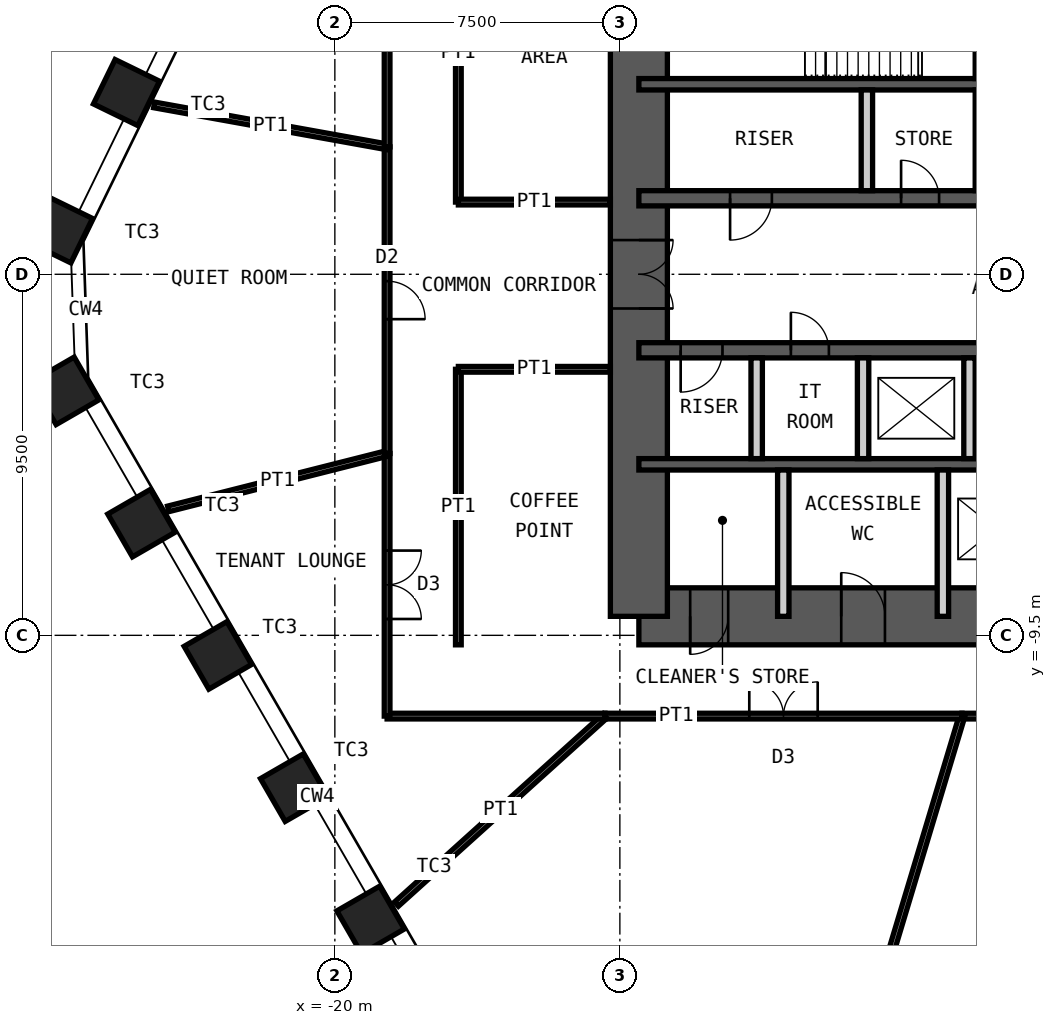
"""IFC4 building model, lengths in metres.
Left out: names, types, materials, properties, quantities, classifications, styles, units other than length and angle.
Written with IfcOpenShell. Run it as: python <this file> out.ifc"""

import sys

from ifc_helpers import new_model, si_unit, direction, frame, frame_2d, origin, origin_2d, place, context, subcontext, project, spatial, rectangle, hollow_rectangle, extrude, element, fill, save


model = new_model("IFC4")
c1 = context("Model", 3, precision=1e-05, world=origin(), true_north=direction((0.0, 1.0)))
c2 = subcontext(c1, "Body", "Model", "MODEL_VIEW")
j1 = project(units=[si_unit("LENGTHUNIT", "METRE"), si_unit("PLANEANGLEUNIT", "RADIAN")], contexts=[c1])
p1 = place(None, origin())
s1 = spatial("IfcSite", under=j1, at=p1, CompositionType="ELEMENT")
p2 = place(p1, origin())
s2 = spatial("IfcBuilding", under=s1, at=p2, CompositionType="ELEMENT")
p3 = place(p2, frame((0.0, 0.0, 132.4)))
s3 = spatial("IfcBuildingStorey", under=s2, at=p3, CompositionType="ELEMENT", Elevation=132.4)
for number, where, z_axis, x_axis in (
    (1, (-19.059, -16.989, 0.0), (0.0, 0.0, 1.0), (0.5, -0.866, 0.0)),
    (2, (-21.068, -13.509, 0.0), (0.0, 0.0, 1.0), (0.5, -0.866, 0.0)),
    (3, (-23.078, -10.028, 0.0), (0.0, 0.0, 1.0), (0.5, -0.866, 0.0)),
    (4, (-25.087, -6.547, 0.0), (0.0, 0.0, 1.0), (0.5, -0.866, 0.0)),
    (5, (-27.097, -3.067, 0.0), (0.0, 0.0, 1.0), (0.5, -0.866, 0.0)),
    (6, (-27.245, 1.169, 0.0), (0.0, 0.0, 1.0), (-0.438, -0.899, 0.0)),
    (7, (-25.483, 4.781, 0.0), (0.0, 0.0, 1.0), (-0.438, -0.899, 0.0)),
):
    element("IfcColumn", number, at=place(p3, frame(where, z_axis=z_axis, x_axis=x_axis)), inside=s3, PredefinedType="COLUMN", context=c2, shape_type="SweptSolid", body=[
        extrude(hollow_rectangle(XDim=1.3, YDim=1.3, WallThickness=0.1, at=origin_2d()), origin(), (0.0, 0.0, 1.0), 4.2),
    ])
p4 = place(p3, frame((-12.0, -9.0, 0.0), z_axis=(0.0, 0.0, 1.0), x_axis=(1.0, 0.0, 0.0)))
e8 = element("IfcWall", 8, at=p4, inside=s3, PredefinedType="SHEAR", context=c2, shape_type="SweptSolid", body=[
    extrude(rectangle(XDim=24.0, YDim=1.5, at=frame_2d((12.0, 0.0))), origin(), (0.0, 0.0, 1.0), 4.2),
])
p5 = place(p4, frame((1.35, 0.0, 0.0)))
e9 = element("IfcOpeningElement", 9, at=p5, cuts=e8, PredefinedType="OPENING", context=c2, shape_type="SweptSolid", body=[
    extrude(rectangle(XDim=1.0, YDim=2.1, at=frame_2d((0.5, 1.05))), frame((0.0, 0.76, 0.0), z_axis=(0.0, -1.0, 0.0), x_axis=(1.0, 0.0, 0.0)), (0.0, 0.0, 1.0), 1.52),
])
p6 = place(p4, frame((5.325, 0.0, 0.0)))
e10 = element("IfcOpeningElement", 10, at=p6, cuts=e8, PredefinedType="OPENING", context=c2, shape_type="SweptSolid", body=[
    extrude(rectangle(XDim=1.15, YDim=2.1, at=frame_2d((0.575, 1.05))), frame((0.0, 0.76, 0.0), z_axis=(0.0, -1.0, 0.0), x_axis=(1.0, 0.0, 0.0)), (0.0, 0.0, 1.0), 1.52),
])
p7 = place(p4, frame((12.6, 0.0, 0.0)))
e11 = element("IfcOpeningElement", 11, at=p7, cuts=e8, PredefinedType="OPENING", context=c2, shape_type="SweptSolid", body=[
    extrude(rectangle(XDim=1.0, YDim=2.1, at=frame_2d((0.5, 1.05))), frame((0.0, 0.76, 0.0), z_axis=(0.0, -1.0, 0.0), x_axis=(1.0, 0.0, 0.0)), (0.0, 0.0, 1.0), 1.52),
])
p8 = place(p3, frame((-12.0, -9.0, 0.0), z_axis=(0.0, 0.0, 1.0), x_axis=(0.0, 1.0, 0.0)))
e12 = element("IfcWall", 12, at=p8, inside=s3, PredefinedType="SHEAR", context=c2, shape_type="SweptSolid", body=[
    extrude(rectangle(XDim=18.0, YDim=1.5, at=frame_2d((9.0, 0.0))), origin(), (0.0, 0.0, 1.0), 4.2),
])
p9 = place(p8, frame((8.1, 0.0, 0.0)))
e13 = element("IfcOpeningElement", 13, at=p9, cuts=e12, PredefinedType="OPENING", context=c2, shape_type="SweptSolid", body=[
    extrude(rectangle(XDim=1.8, YDim=2.1, at=frame_2d((0.9, 1.05))), frame((0.0, 0.76, 0.0), z_axis=(0.0, -1.0, 0.0), x_axis=(1.0, 0.0, 0.0)), (0.0, 0.0, 1.0), 1.52),
])
p10 = place(p3, frame((-12.0, 5.0, 0.0), z_axis=(0.0, 0.0, 1.0), x_axis=(1.0, 0.0, 0.0)))
e14 = element("IfcWall", 14, at=p10, inside=s3, PredefinedType="SHEAR", context=c2, shape_type="SweptSolid", body=[
    extrude(rectangle(XDim=24.0, YDim=0.3, at=frame_2d((12.0, 0.0))), origin(), (0.0, 0.0, 1.0), 4.2),
])
p11 = place(p3, frame((-12.0, 2.0, 0.0), z_axis=(0.0, 0.0, 1.0), x_axis=(1.0, 0.0, 0.0)))
e15 = element("IfcWall", 15, at=p11, inside=s3, PredefinedType="SHEAR", context=c2, shape_type="SweptSolid", body=[
    extrude(rectangle(XDim=24.0, YDim=0.4, at=frame_2d((12.0, 0.0))), origin(), (0.0, 0.0, 1.0), 4.2),
])
p12 = place(p11, frame((2.4, 0.0, 0.0)))
e16 = element("IfcOpeningElement", 16, at=p12, cuts=e15, PredefinedType="OPENING", context=c2, shape_type="SweptSolid", body=[
    extrude(rectangle(XDim=1.1, YDim=2.1, at=frame_2d((0.55, 1.05))), frame((0.0, 0.21, 0.0), z_axis=(0.0, -1.0, 0.0), x_axis=(1.0, 0.0, 0.0)), (0.0, 0.0, 1.0), 0.42),
])
p13 = place(p11, frame((22.0, 0.0, 0.0)))
e17 = element("IfcOpeningElement", 17, at=p13, cuts=e15, PredefinedType="OPENING", context=c2, shape_type="SweptSolid", body=[
    extrude(rectangle(XDim=1.1, YDim=2.1, at=frame_2d((0.55, 1.05))), frame((0.0, 0.21, 0.0), z_axis=(0.0, -1.0, 0.0), x_axis=(1.0, 0.0, 0.0)), (0.0, 0.0, 1.0), 0.42),
])
p14 = place(p11, frame((10.15, 0.0, 0.0)))
e18 = element("IfcOpeningElement", 18, at=p14, cuts=e15, PredefinedType="OPENING", context=c2, shape_type="SweptSolid", body=[
    extrude(rectangle(XDim=1.0, YDim=2.1, at=frame_2d((0.5, 1.05))), frame((0.0, 0.21, 0.0), z_axis=(0.0, -1.0, 0.0), x_axis=(1.0, 0.0, 0.0)), (0.0, 0.0, 1.0), 0.42),
])
p15 = place(p11, frame((6.9, 0.0, 0.0)))
e19 = element("IfcOpeningElement", 19, at=p15, cuts=e15, PredefinedType="OPENING", context=c2, shape_type="SweptSolid", body=[
    extrude(rectangle(XDim=1.0, YDim=2.1, at=frame_2d((0.5, 1.05))), frame((0.0, 0.21, 0.0), z_axis=(0.0, -1.0, 0.0), x_axis=(1.0, 0.0, 0.0)), (0.0, 0.0, 1.0), 0.42),
])
p16 = place(p11, frame((13.35, 0.0, 0.0)))
e20 = element("IfcOpeningElement", 20, at=p16, cuts=e15, PredefinedType="OPENING", context=c2, shape_type="SweptSolid", body=[
    extrude(rectangle(XDim=1.1, YDim=2.4, at=frame_2d((0.55, 1.2))), frame((0.0, 0.21, 0.0), z_axis=(0.0, -1.0, 0.0), x_axis=(1.0, 0.0, 0.0)), (0.0, 0.0, 1.0), 0.42),
])
p17 = place(p11, frame((16.15, 0.0, 0.0)))
e21 = element("IfcOpeningElement", 21, at=p17, cuts=e15, PredefinedType="OPENING", context=c2, shape_type="SweptSolid", body=[
    extrude(rectangle(XDim=1.1, YDim=2.4, at=frame_2d((0.55, 1.2))), frame((0.0, 0.21, 0.0), z_axis=(0.0, -1.0, 0.0), x_axis=(1.0, 0.0, 0.0)), (0.0, 0.0, 1.0), 0.42),
])
p18 = place(p11, frame((18.95, 0.0, 0.0)))
e22 = element("IfcOpeningElement", 22, at=p18, cuts=e15, PredefinedType="OPENING", context=c2, shape_type="SweptSolid", body=[
    extrude(rectangle(XDim=1.1, YDim=2.4, at=frame_2d((0.55, 1.2))), frame((0.0, 0.21, 0.0), z_axis=(0.0, -1.0, 0.0), x_axis=(1.0, 0.0, 0.0)), (0.0, 0.0, 1.0), 0.42),
])
p19 = place(p3, frame((-12.0, -2.0, 0.0), z_axis=(0.0, 0.0, 1.0), x_axis=(1.0, 0.0, 0.0)))
e23 = element("IfcWall", 23, at=p19, inside=s3, PredefinedType="SHEAR", context=c2, shape_type="SweptSolid", body=[
    extrude(rectangle(XDim=24.0, YDim=0.4, at=frame_2d((12.0, 0.0))), origin(), (0.0, 0.0, 1.0), 4.2),
])
p20 = place(p19, frame((1.1, 0.0, 0.0)))
e24 = element("IfcOpeningElement", 24, at=p20, cuts=e23, PredefinedType="OPENING", context=c2, shape_type="SweptSolid", body=[
    extrude(rectangle(XDim=1.1, YDim=2.1, at=frame_2d((0.55, 1.05))), frame((0.0, 0.21, 0.0), z_axis=(0.0, -1.0, 0.0), x_axis=(1.0, 0.0, 0.0)), (0.0, 0.0, 1.0), 0.42),
])
p21 = place(p19, frame((13.55, 0.0, 0.0)))
e25 = element("IfcOpeningElement", 25, at=p21, cuts=e23, PredefinedType="OPENING", context=c2, shape_type="SweptSolid", body=[
    extrude(rectangle(XDim=1.1, YDim=2.1, at=frame_2d((0.55, 1.05))), frame((0.0, 0.21, 0.0), z_axis=(0.0, -1.0, 0.0), x_axis=(1.0, 0.0, 0.0)), (0.0, 0.0, 1.0), 0.42),
])
p22 = place(p19, frame((20.7, 0.0, 0.0)))
e26 = element("IfcOpeningElement", 26, at=p22, cuts=e23, PredefinedType="OPENING", context=c2, shape_type="SweptSolid", body=[
    extrude(rectangle(XDim=1.1, YDim=2.1, at=frame_2d((0.55, 1.05))), frame((0.0, 0.21, 0.0), z_axis=(0.0, -1.0, 0.0), x_axis=(1.0, 0.0, 0.0)), (0.0, 0.0, 1.0), 0.42),
])
p23 = place(p19, frame((4.0, 0.0, 0.0)))
e27 = element("IfcOpeningElement", 27, at=p23, cuts=e23, PredefinedType="OPENING", context=c2, shape_type="SweptSolid", body=[
    extrude(rectangle(XDim=1.0, YDim=2.1, at=frame_2d((0.5, 1.05))), frame((0.0, 0.21, 0.0), z_axis=(0.0, -1.0, 0.0), x_axis=(1.0, 0.0, 0.0)), (0.0, 0.0, 1.0), 0.42),
])
p24 = place(p3, frame((-12.0, -5.0, 0.0), z_axis=(0.0, 0.0, 1.0), x_axis=(1.0, 0.0, 0.0)))
e28 = element("IfcWall", 28, at=p24, inside=s3, PredefinedType="SHEAR", context=c2, shape_type="SweptSolid", body=[
    extrude(rectangle(XDim=24.0, YDim=0.3, at=frame_2d((12.0, 0.0))), origin(), (0.0, 0.0, 1.0), 4.2),
])
p25 = place(p3, frame((-3.0, 5.15, 0.0), z_axis=(0.0, 0.0, 1.0), x_axis=(0.0, 1.0, 0.0)))
e29 = element("IfcWall", 29, at=p25, inside=s3, PredefinedType="PARTITIONING", context=c2, shape_type="SweptSolid", body=[
    extrude(rectangle(XDim=3.85, YDim=0.3, at=frame_2d((1.925, 0.0))), origin(), (0.0, 0.0, 1.0), 3.98),
])
p26 = place(p25, frame((1.425, 0.0, 0.0)))
e30 = element("IfcOpeningElement", 30, at=p26, cuts=e29, PredefinedType="OPENING", context=c2, shape_type="SweptSolid", body=[
    extrude(rectangle(XDim=1.0, YDim=2.1, at=frame_2d((0.5, 1.05))), frame((0.0, 0.16, 0.0), z_axis=(0.0, -1.0, 0.0), x_axis=(1.0, 0.0, 0.0)), (0.0, 0.0, 1.0), 0.32),
])
for number, where, z_axis, x_axis in (
    (31, (-6.0, 2.2, 0.0), (0.0, 0.0, 1.0), (0.0, 1.0, 0.0)),
    (32, (-3.0, 2.2, 0.0), (0.0, 0.0, 1.0), (0.0, 1.0, 0.0)),
    (33, (-8.9, -4.85, 0.0), (0.0, 0.0, 1.0), (0.0, 1.0, 0.0)),
    (34, (-6.1, -4.85, 0.0), (0.0, 0.0, 1.0), (0.0, 1.0, 0.0)),
    (35, (-3.3, -4.85, 0.0), (0.0, 0.0, 1.0), (0.0, 1.0, 0.0)),
):
    element("IfcWall", number, at=place(p3, frame(where, z_axis=z_axis, x_axis=x_axis)), inside=s3, PredefinedType="PARTITIONING", context=c2, shape_type="SweptSolid", body=[
        extrude(rectangle(XDim=2.65, YDim=0.3, at=frame_2d((1.325, 0.0))), origin(), (0.0, 0.0, 1.0), 3.98),
    ])
for number, where, z_axis, x_axis in (
    (36, (-8.2, -9.0, 0.0), (0.0, 0.0, 1.0), (0.0, 1.0, 0.0)),
    (37, (-4.0, -9.0, 0.0), (0.0, 0.0, 1.0), (0.0, 1.0, 0.0)),
):
    element("IfcWall", number, at=place(p3, frame(where, z_axis=z_axis, x_axis=x_axis)), inside=s3, PredefinedType="PARTITIONING", context=c2, shape_type="SweptSolid", body=[
        extrude(rectangle(XDim=3.85, YDim=0.3, at=frame_2d((1.925, 0.0))), origin(), (0.0, 0.0, 1.0), 3.98),
    ])
p27 = place(p3, frame((2.197, -11.625, 0.0), z_axis=(0.0, 0.0, 1.0), x_axis=(-1.0, 0.0, 0.0)))
e38 = element("IfcWall", 38, at=p27, inside=s3, PredefinedType="PARTITIONING", context=c2, shape_type="SweptSolid", body=[
    extrude(rectangle(XDim=5.694, YDim=0.15, at=frame_2d((2.847, 0.0))), origin(), (0.0, 0.0, 1.0), 4.03),
])
p28 = place(p27, frame((1.947, 0.0, 0.0)))
e39 = element("IfcOpeningElement", 39, at=p28, cuts=e38, PredefinedType="OPENING", context=c2, shape_type="SweptSolid", body=[
    extrude(rectangle(XDim=1.8, YDim=2.4, at=frame_2d((0.9, 1.2))), frame((0.0, 0.085, 0.0), z_axis=(0.0, -1.0, 0.0), x_axis=(1.0, 0.0, 0.0)), (0.0, 0.0, 1.0), 0.17),
])
p29 = place(p3, frame((-7.456, -24.787, 0.0), z_axis=(0.0, 0.0, 1.0), x_axis=(0.288055049501, 0.957613851433, 0.0)))
e40 = element("IfcWall", 40, at=p29, inside=s3, PredefinedType="PARTITIONING", context=c2, shape_type="SweptSolid", body=[
    extrude(rectangle(XDim=13.745, YDim=0.15, at=frame_2d((6.872, 0.0))), origin(), (0.0, 0.0, 1.0), 3.28),
])
p30 = place(p3, frame((-3.497, -11.625, 0.0), z_axis=(0.0, 0.0, 1.0), x_axis=(-1.0, 0.0, 0.0)))
e41 = element("IfcWall", 41, at=p30, inside=s3, PredefinedType="PARTITIONING", context=c2, shape_type="SweptSolid", body=[
    extrude(rectangle(XDim=9.395, YDim=0.15, at=frame_2d((4.698, 0.0))), origin(), (0.0, 0.0, 1.0), 4.03),
])
p31 = place(p30, frame((3.798, 0.0, 0.0)))
e42 = element("IfcOpeningElement", 42, at=p31, cuts=e41, PredefinedType="OPENING", context=c2, shape_type="SweptSolid", body=[
    extrude(rectangle(XDim=1.8, YDim=2.4, at=frame_2d((0.9, 1.2))), frame((0.0, 0.085, 0.0), z_axis=(0.0, -1.0, 0.0), x_axis=(1.0, 0.0, 0.0)), (0.0, 0.0, 1.0), 0.17),
])
p32 = place(p3, frame((-18.378, -16.572, 0.0), z_axis=(0.0, 0.0, 1.0), x_axis=(0.742666079924, 0.669661924951, 0.0)))
e43 = element("IfcWall", 43, at=p32, inside=s3, PredefinedType="PARTITIONING", context=c2, shape_type="SweptSolid", body=[
    extrude(rectangle(XDim=7.387, YDim=0.15, at=frame_2d((3.694, 0.0))), origin(), (0.0, 0.0, 1.0), 3.33),
])
p33 = place(p3, frame((-12.892, -11.625, 0.0), z_axis=(0.0, 0.0, 1.0), x_axis=(-1.0, 0.0, 0.0)))
e44 = element("IfcWall", 44, at=p33, inside=s3, PredefinedType="PARTITIONING", context=c2, shape_type="SweptSolid", body=[
    extrude(rectangle(XDim=5.733, YDim=0.15, at=frame_2d((2.866, 0.0))), origin(), (0.0, 0.0, 1.0), 4.03),
])
p34 = place(p3, frame((-18.625, -11.625, 0.0), z_axis=(0.0, 0.0, 1.0), x_axis=(0.0, 1.0, 0.0)))
e45 = element("IfcWall", 45, at=p34, inside=s3, PredefinedType="PARTITIONING", context=c2, shape_type="SweptSolid", body=[
    extrude(rectangle(XDim=6.91, YDim=0.15, at=frame_2d((3.455, 0.0))), origin(), (0.0, 0.0, 1.0), 4.03),
])
p35 = place(p34, frame((2.555, 0.0, 0.0)))
e46 = element("IfcOpeningElement", 46, at=p35, cuts=e45, PredefinedType="OPENING", context=c2, shape_type="SweptSolid", body=[
    extrude(rectangle(XDim=1.8, YDim=2.4, at=frame_2d((0.9, 1.2))), frame((0.0, 0.085, 0.0), z_axis=(0.0, -1.0, 0.0), x_axis=(1.0, 0.0, 0.0)), (0.0, 0.0, 1.0), 0.17),
])
p36 = place(p3, frame((-24.384, -6.173, 0.0), z_axis=(0.0, 0.0, 1.0), x_axis=(0.969427635767, 0.245377380804, 0.0)))
e47 = element("IfcWall", 47, at=p36, inside=s3, PredefinedType="PARTITIONING", context=c2, shape_type="SweptSolid", body=[
    extrude(rectangle(XDim=5.941, YDim=0.15, at=frame_2d((2.97, 0.0))), origin(), (0.0, 0.0, 1.0), 3.33),
])
p37 = place(p3, frame((-18.625, -4.715, 0.0), z_axis=(0.0, 0.0, 1.0), x_axis=(0.0, 1.0, 0.0)))
e48 = element("IfcWall", 48, at=p37, inside=s3, PredefinedType="PARTITIONING", context=c2, shape_type="SweptSolid", body=[
    extrude(rectangle(XDim=8.068, YDim=0.15, at=frame_2d((4.034, 0.0))), origin(), (0.0, 0.0, 1.0), 4.03),
])
p38 = place(p37, frame((3.534, 0.0, 0.0)))
e49 = element("IfcOpeningElement", 49, at=p38, cuts=e48, PredefinedType="OPENING", context=c2, shape_type="SweptSolid", body=[
    extrude(rectangle(XDim=1.0, YDim=2.4, at=frame_2d((0.5, 1.2))), frame((0.0, 0.085, 0.0), z_axis=(0.0, -1.0, 0.0), x_axis=(1.0, 0.0, 0.0)), (0.0, 0.0, 1.0), 0.17),
])
p39 = place(p3, frame((-24.755, 4.457, 0.0), z_axis=(0.0, 0.0, 1.0), x_axis=(0.984175122587, -0.177198555524, 0.0)))
e50 = element("IfcWall", 50, at=p39, inside=s3, PredefinedType="PARTITIONING", context=c2, shape_type="SweptSolid", body=[
    extrude(rectangle(XDim=6.229, YDim=0.15, at=frame_2d((3.115, 0.0))), origin(), (0.0, 0.0, 1.0), 3.33),
])
p40 = place(p3, frame((-18.625, 3.353, 0.0), z_axis=(0.0, 0.0, 1.0), x_axis=(0.0, 1.0, 0.0)))
e51 = element("IfcWall", 51, at=p40, inside=s3, PredefinedType="PARTITIONING", context=c2, shape_type="SweptSolid", body=[
    extrude(rectangle(XDim=8.272, YDim=0.15, at=frame_2d((4.136, 0.0))), origin(), (0.0, 0.0, 1.0), 4.03),
])
p41 = place(p40, frame((3.236, 0.0, 0.0)))
e52 = element("IfcOpeningElement", 52, at=p41, cuts=e51, PredefinedType="OPENING", context=c2, shape_type="SweptSolid", body=[
    extrude(rectangle(XDim=1.8, YDim=2.4, at=frame_2d((0.9, 1.2))), frame((0.0, 0.085, 0.0), z_axis=(0.0, -1.0, 0.0), x_axis=(1.0, 0.0, 0.0)), (0.0, 0.0, 1.0), 0.17),
])
p42 = place(p3, frame((-16.75, 1.9, 0.0), z_axis=(0.0, 0.0, 1.0), x_axis=(0.0, 1.0, 0.0)))
e53 = element("IfcWall", 53, at=p42, inside=s3, PredefinedType="PARTITIONING", context=c2, shape_type="SweptSolid", body=[
    extrude(rectangle(XDim=7.85, YDim=0.15, at=frame_2d((3.925, 0.0))), origin(), (0.0, 0.0, 1.0), 4.03),
])
p43 = place(p3, frame((-12.75, 1.9, 0.0), z_axis=(0.0, 0.0, 1.0), x_axis=(-1.0, 0.0, 0.0)))
e54 = element("IfcWall", 54, at=p43, inside=s3, PredefinedType="PARTITIONING", context=c2, shape_type="SweptSolid", body=[
    extrude(rectangle(XDim=4.0, YDim=0.15, at=frame_2d((2.0, 0.0))), origin(), (0.0, 0.0, 1.0), 3.33),
])
p44 = place(p3, frame((-16.75, -9.75, 0.0), z_axis=(0.0, 0.0, 1.0), x_axis=(0.0, 1.0, 0.0)))
e55 = element("IfcWall", 55, at=p44, inside=s3, PredefinedType="PARTITIONING", context=c2, shape_type="SweptSolid", body=[
    extrude(rectangle(XDim=7.25, YDim=0.15, at=frame_2d((3.625, 0.0))), origin(), (0.0, 0.0, 1.0), 4.03),
])
p45 = place(p3, frame((-12.75, -2.5, 0.0), z_axis=(0.0, 0.0, 1.0), x_axis=(-1.0, 0.0, 0.0)))
e56 = element("IfcWall", 56, at=p45, inside=s3, PredefinedType="PARTITIONING", context=c2, shape_type="SweptSolid", body=[
    extrude(rectangle(XDim=4.0, YDim=0.15, at=frame_2d((2.0, 0.0))), origin(), (0.0, 0.0, 1.0), 3.33),
])
p46 = place(p5, origin())
e57 = element("IfcDoor", 57, at=p46, inside=s3, OperationType="SINGLE_SWING_LEFT", PredefinedType="DOOR", context=c2, shape_type="SweptSolid", body=[
    extrude(rectangle(XDim=1.0, YDim=2.1, at=frame_2d((0.5, 1.05))), frame((0.0, 0.025, 0.0), z_axis=(0.0, -1.0, 0.0), x_axis=(1.0, 0.0, 0.0)), (0.0, 0.0, 1.0), 0.05),
])
fill(e9, e57)
p47 = place(p6, origin())
e58 = element("IfcDoor", 58, at=p47, inside=s3, OperationType="SINGLE_SWING_RIGHT", PredefinedType="DOOR", context=c2, shape_type="SweptSolid", body=[
    extrude(rectangle(XDim=1.15, YDim=2.1, at=frame_2d((0.575, 1.05))), frame((0.0, 0.025, 0.0), z_axis=(0.0, -1.0, 0.0), x_axis=(1.0, 0.0, 0.0)), (0.0, 0.0, 1.0), 0.05),
])
fill(e10, e58)
p48 = place(p12, origin())
e59 = element("IfcDoor", 59, at=p48, inside=s3, OperationType="SINGLE_SWING_LEFT", PredefinedType="DOOR", context=c2, shape_type="SweptSolid", body=[
    extrude(rectangle(XDim=1.1, YDim=2.1, at=frame_2d((0.55, 1.05))), frame((0.0, 0.025, 0.0), z_axis=(0.0, -1.0, 0.0), x_axis=(1.0, 0.0, 0.0)), (0.0, 0.0, 1.0), 0.05),
])
fill(e16, e59)
p49 = place(p20, origin())
e60 = element("IfcDoor", 60, at=p49, inside=s3, OperationType="SINGLE_SWING_LEFT", PredefinedType="DOOR", context=c2, shape_type="SweptSolid", body=[
    extrude(rectangle(XDim=1.1, YDim=2.1, at=frame_2d((0.55, 1.05))), frame((0.0, 0.025, 0.0), z_axis=(0.0, -1.0, 0.0), x_axis=(1.0, 0.0, 0.0)), (0.0, 0.0, 1.0), 0.05),
])
fill(e24, e60)
p50 = place(p9, origin())
e61 = element("IfcDoor", 61, at=p50, inside=s3, OperationType="DOUBLE_DOOR_DOUBLE_SWING", PredefinedType="DOOR", context=c2, shape_type="SweptSolid", body=[
    extrude(rectangle(XDim=1.8, YDim=2.1, at=frame_2d((0.9, 1.05))), frame((0.0, 0.025, 0.0), z_axis=(0.0, -1.0, 0.0), x_axis=(1.0, 0.0, 0.0)), (0.0, 0.0, 1.0), 0.05),
])
fill(e13, e61)
p51 = place(p15, origin())
e62 = element("IfcDoor", 62, at=p51, inside=s3, OperationType="SINGLE_SWING_RIGHT", PredefinedType="DOOR", context=c2, shape_type="SweptSolid", body=[
    extrude(rectangle(XDim=1.0, YDim=2.1, at=frame_2d((0.5, 1.05))), frame((0.0, 0.025, 0.0), z_axis=(0.0, -1.0, 0.0), x_axis=(1.0, 0.0, 0.0)), (0.0, 0.0, 1.0), 0.05),
])
fill(e19, e62)
p52 = place(p23, origin())
e63 = element("IfcDoor", 63, at=p52, inside=s3, OperationType="SINGLE_SWING_RIGHT", PredefinedType="DOOR", context=c2, shape_type="SweptSolid", body=[
    extrude(rectangle(XDim=1.0, YDim=2.1, at=frame_2d((0.5, 1.05))), frame((0.0, 0.025, 0.0), z_axis=(0.0, -1.0, 0.0), x_axis=(1.0, 0.0, 0.0)), (0.0, 0.0, 1.0), 0.05),
])
fill(e27, e63)
p53 = place(p31, origin())
e64 = element("IfcDoor", 64, at=p53, inside=s3, OperationType="DOUBLE_DOOR_DOUBLE_SWING", PredefinedType="DOOR", context=c2, shape_type="SweptSolid", body=[
    extrude(rectangle(XDim=1.8, YDim=2.4, at=frame_2d((0.9, 1.2))), frame((0.0, 0.025, 0.0), z_axis=(0.0, -1.0, 0.0), x_axis=(1.0, 0.0, 0.0)), (0.0, 0.0, 1.0), 0.05),
])
fill(e42, e64)
p54 = place(p35, origin())
e65 = element("IfcDoor", 65, at=p54, inside=s3, OperationType="DOUBLE_DOOR_DOUBLE_SWING", PredefinedType="DOOR", context=c2, shape_type="SweptSolid", body=[
    extrude(rectangle(XDim=1.8, YDim=2.4, at=frame_2d((0.9, 1.2))), frame((0.0, 0.025, 0.0), z_axis=(0.0, -1.0, 0.0), x_axis=(1.0, 0.0, 0.0)), (0.0, 0.0, 1.0), 0.05),
])
fill(e46, e65)
p55 = place(p38, origin())
e66 = element("IfcDoor", 66, at=p55, inside=s3, OperationType="SINGLE_SWING_LEFT", PredefinedType="DOOR", context=c2, shape_type="SweptSolid", body=[
    extrude(rectangle(XDim=1.0, YDim=2.4, at=frame_2d((0.5, 1.2))), frame((0.0, 0.025, 0.0), z_axis=(0.0, -1.0, 0.0), x_axis=(1.0, 0.0, 0.0)), (0.0, 0.0, 1.0), 0.05),
])
fill(e49, e66)
save(model, sys.argv[1])
